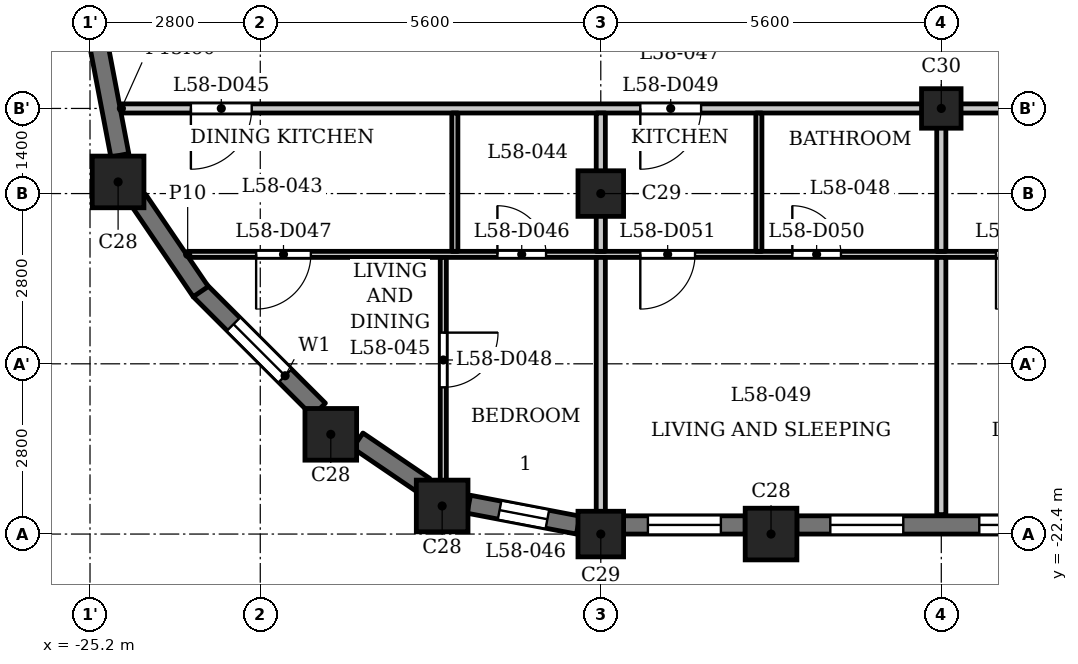
"""IFC4 building model, lengths in metres.
Left out: names, types, materials, properties, quantities, classifications, styles, units other than length and angle.
Written with IfcOpenShell. Run it as: python <this file> out.ifc"""

import sys

from ifc_helpers import new_model, si_unit, direction, frame, frame_2d, origin, origin_2d, place, context, subcontext, project, spatial, rectangle, extrude, element, fill, save


model = new_model("IFC4")
c1 = context("Model", 3, precision=1e-05, world=origin(), true_north=direction((0.0, 1.0)))
c2 = subcontext(c1, "Body", "Model", "MODEL_VIEW")
j1 = project(units=[si_unit("LENGTHUNIT", "METRE"), si_unit("PLANEANGLEUNIT", "RADIAN")], contexts=[c1])
p1 = place(None, origin())
s1 = spatial("IfcSite", under=j1, at=p1, CompositionType="ELEMENT")
p2 = place(p1, origin())
s2 = spatial("IfcBuilding", under=s1, at=p2, CompositionType="ELEMENT")
p3 = place(p2, frame((0.0, 0.0, 223.9)))
s3 = spatial("IfcBuildingStorey", under=s2, at=p3, CompositionType="ELEMENT", Elevation=223.9)
for number, where, z_axis, x_axis in (
    (1, (-19.409, -21.938, 0.0), (0.0, 0.0, 1.0), (1.0, 0.0, 0.0)),
    (2, (-14.0, -22.4, 0.0), (0.0, 0.0, 1.0), (1.0, 0.0, 0.0)),
    (3, (-24.738, -16.609, 0.0), (0.0, 0.0, 1.0), (1.0, 0.0, 0.0)),
    (4, (-21.24, -20.76, 0.0), (0.0, 0.0, 1.0), (1.0, 0.0, 0.0)),
):
    element("IfcColumn", number, at=place(p3, frame(where, z_axis=z_axis, x_axis=x_axis)), inside=s3, PredefinedType="COLUMN", context=c2, shape_type="SweptSolid", body=[
        extrude(rectangle(XDim=0.85, YDim=0.85, at=origin_2d()), origin(), (0.0, 0.0, 1.0), 3.5),
    ])
for number, where, z_axis, x_axis in (
    (5, (-16.8, -22.4, 0.0), (0.0, 0.0, 1.0), (1.0, 0.0, 0.0)),
    (6, (-16.8, -16.8, 0.0), (0.0, 0.0, 1.0), (1.0, 0.0, 0.0)),
):
    element("IfcColumn", number, at=place(p3, frame(where, z_axis=z_axis, x_axis=x_axis)), inside=s3, PredefinedType="COLUMN", context=c2, shape_type="SweptSolid", body=[
        extrude(rectangle(XDim=0.75, YDim=0.75, at=origin_2d()), origin(), (0.0, 0.0, 1.0), 3.5),
    ])
p4 = place(p3, frame((-11.2, -15.4, 0.0), z_axis=(0.0, 0.0, 1.0), x_axis=(1.0, 0.0, 0.0)))
e7 = element("IfcColumn", 7, at=p4, inside=s3, PredefinedType="COLUMN", context=c2, shape_type="SweptSolid", body=[
    extrude(rectangle(XDim=0.65, YDim=0.65, at=origin_2d()), origin(), (0.0, 0.0, 1.0), 3.5),
])
p5 = place(p3, frame((-23.397, -18.391, 0.0), z_axis=(0.0, 0.0, 1.0), x_axis=(0.707106781187, -0.707106781187, 0.0)))
e8 = element("IfcWall", 8, at=p5, inside=s3, PredefinedType="SOLIDWALL", context=c2, shape_type="SweptSolid", body=[
    extrude(rectangle(XDim=2.775, YDim=0.3, at=frame_2d((1.388, 0.0))), origin(), (0.0, 0.0, 1.0), 2.5),
])
p6 = place(p5, frame((0.788, 0.0, 0.6)))
e9 = element("IfcOpeningElement", 9, at=p6, cuts=e8, PredefinedType="OPENING", context=c2, shape_type="SweptSolid", body=[
    extrude(rectangle(XDim=1.2, YDim=1.55, at=frame_2d((0.6, 0.775))), frame((0.0, 0.16, 0.0), z_axis=(0.0, -1.0, 0.0), x_axis=(1.0, 0.0, 0.0)), (0.0, 0.0, 1.0), 0.32),
])
p7 = place(p3, frame((-20.796, -20.862, 0.0), z_axis=(0.0, 0.0, 1.0), x_axis=(0.827035970432, -0.562149004813, 0.0)))
e10 = element("IfcWall", 10, at=p7, inside=s3, PredefinedType="SOLIDWALL", context=c2, shape_type="SweptSolid", body=[
    extrude(rectangle(XDim=1.327, YDim=0.3, at=frame_2d((0.664, 0.0))), origin(), (0.0, 0.0, 1.0), 2.5),
])
p8 = place(p3, frame((-18.971, -21.91, 0.0), z_axis=(0.0, 0.0, 1.0), x_axis=(0.982300037503, -0.187314271538, 0.0)))
e11 = element("IfcWall", 11, at=p8, inside=s3, PredefinedType="SOLIDWALL", context=c2, shape_type="SweptSolid", body=[
    extrude(rectangle(XDim=1.831, YDim=0.3, at=frame_2d((0.916, 0.0))), origin(), (0.0, 0.0, 1.0), 2.5),
])
p9 = place(p8, frame((0.516, 0.0, 0.6)))
e12 = element("IfcOpeningElement", 12, at=p9, cuts=e11, PredefinedType="OPENING", context=c2, shape_type="SweptSolid", body=[
    extrude(rectangle(XDim=0.8, YDim=1.55, at=frame_2d((0.4, 0.775))), frame((0.0, 0.16, 0.0), z_axis=(0.0, -1.0, 0.0), x_axis=(1.0, 0.0, 0.0)), (0.0, 0.0, 1.0), 0.32),
])
p10 = place(p3, frame((-16.425, -22.25, 0.0), z_axis=(0.0, 0.0, 1.0), x_axis=(1.0, 0.0, 0.0)))
e13 = element("IfcWall", 13, at=p10, inside=s3, PredefinedType="SOLIDWALL", context=c2, shape_type="SweptSolid", body=[
    extrude(rectangle(XDim=2.0, YDim=0.3, at=frame_2d((1.0, 0.0))), origin(), (0.0, 0.0, 1.0), 2.5),
])
p11 = place(p10, frame((0.4, 0.0, 0.6)))
e14 = element("IfcOpeningElement", 14, at=p11, cuts=e13, PredefinedType="OPENING", context=c2, shape_type="SweptSolid", body=[
    extrude(rectangle(XDim=1.2, YDim=1.55, at=frame_2d((0.6, 0.775))), frame((0.0, 0.16, 0.0), z_axis=(0.0, -1.0, 0.0), x_axis=(1.0, 0.0, 0.0)), (0.0, 0.0, 1.0), 0.32),
])
p12 = place(p3, frame((-13.575, -22.25, 0.0), z_axis=(0.0, 0.0, 1.0), x_axis=(1.0, 0.0, 0.0)))
e15 = element("IfcWall", 15, at=p12, inside=s3, PredefinedType="SOLIDWALL", context=c2, shape_type="SweptSolid", body=[
    extrude(rectangle(XDim=4.75, YDim=0.3, at=frame_2d((2.375, 0.0))), origin(), (0.0, 0.0, 1.0), 2.5),
])
p13 = place(p12, frame((0.55, 0.0, 0.6)))
e16 = element("IfcOpeningElement", 16, at=p13, cuts=e15, PredefinedType="OPENING", context=c2, shape_type="SweptSolid", body=[
    extrude(rectangle(XDim=1.2, YDim=1.55, at=frame_2d((0.6, 0.775))), frame((0.0, 0.16, 0.0), z_axis=(0.0, -1.0, 0.0), x_axis=(1.0, 0.0, 0.0)), (0.0, 0.0, 1.0), 0.32),
])
p14 = place(p12, frame((3.0, 0.0, 0.6)))
e17 = element("IfcOpeningElement", 17, at=p14, cuts=e15, PredefinedType="OPENING", context=c2, shape_type="SweptSolid", body=[
    extrude(rectangle(XDim=1.2, YDim=1.55, at=frame_2d((0.6, 0.775))), frame((0.0, 0.16, 0.0), z_axis=(0.0, -1.0, 0.0), x_axis=(1.0, 0.0, 0.0)), (0.0, 0.0, 1.0), 0.32),
])
for number, where, z_axis, x_axis in (
    (18, (-25.053, -14.372, 0.0), (0.0, 0.0, 1.0), (0.187, -0.982, 0.0)),
    (19, (-24.408, -16.898, 0.0), (0.0, 0.0, 1.0), (0.562, -0.827, 0.0)),
):
    element("IfcWall", number, at=place(p3, frame(where, z_axis=z_axis, x_axis=x_axis)), inside=s3, PredefinedType="SOLIDWALL", context=c2, shape_type="SweptSolid", body=[
        extrude(rectangle(XDim=1.831, YDim=0.3, at=frame_2d((0.916, 0.0))), origin(), (0.0, 0.0, 1.0), 2.5),
    ])
p15 = place(p3, frame((-23.594, -17.8, 0.0), z_axis=(0.0, 0.0, 1.0), x_axis=(1.0, 0.0, 0.0)))
e20 = element("IfcWall", 20, at=p15, inside=s3, PredefinedType="PARTITIONING", context=c2, shape_type="SweptSolid", body=[
    extrude(rectangle(XDim=47.188, YDim=0.1, at=frame_2d((23.594, 0.0))), origin(), (0.0, 0.0, 1.0), 3.2),
])
p16 = place(p15, frame((5.094, 0.0, 0.0)))
e21 = element("IfcOpeningElement", 21, at=p16, cuts=e20, PredefinedType="OPENING", context=c2, shape_type="SweptSolid", body=[
    extrude(rectangle(XDim=0.8, YDim=2.1, at=frame_2d((0.4, 1.05))), frame((0.0, 0.06, 0.0), z_axis=(0.0, -1.0, 0.0), x_axis=(1.0, 0.0, 0.0)), (0.0, 0.0, 1.0), 0.12),
])
p17 = place(p15, frame((1.126, 0.0, 0.0)))
e22 = element("IfcOpeningElement", 22, at=p17, cuts=e20, PredefinedType="OPENING", context=c2, shape_type="SweptSolid", body=[
    extrude(rectangle(XDim=0.9, YDim=2.1, at=frame_2d((0.45, 1.05))), frame((0.0, 0.06, 0.0), z_axis=(0.0, -1.0, 0.0), x_axis=(1.0, 0.0, 0.0)), (0.0, 0.0, 1.0), 0.12),
])
p18 = place(p15, frame((9.944, 0.0, 0.0)))
e23 = element("IfcOpeningElement", 23, at=p18, cuts=e20, PredefinedType="OPENING", context=c2, shape_type="SweptSolid", body=[
    extrude(rectangle(XDim=0.8, YDim=2.1, at=frame_2d((0.4, 1.05))), frame((0.0, 0.06, 0.0), z_axis=(0.0, -1.0, 0.0), x_axis=(1.0, 0.0, 0.0)), (0.0, 0.0, 1.0), 0.12),
])
p19 = place(p15, frame((7.444, 0.0, 0.0)))
e24 = element("IfcOpeningElement", 24, at=p19, cuts=e20, PredefinedType="OPENING", context=c2, shape_type="SweptSolid", body=[
    extrude(rectangle(XDim=0.9, YDim=2.1, at=frame_2d((0.45, 1.05))), frame((0.0, 0.06, 0.0), z_axis=(0.0, -1.0, 0.0), x_axis=(1.0, 0.0, 0.0)), (0.0, 0.0, 1.0), 0.12),
])
p20 = place(p15, frame((16.544, 0.0, 0.0)))
e25 = element("IfcOpeningElement", 25, at=p20, cuts=e20, PredefinedType="OPENING", context=c2, shape_type="SweptSolid", body=[
    extrude(rectangle(XDim=0.8, YDim=2.1, at=frame_2d((0.4, 1.05))), frame((0.0, 0.06, 0.0), z_axis=(0.0, -1.0, 0.0), x_axis=(1.0, 0.0, 0.0)), (0.0, 0.0, 1.0), 0.12),
])
p21 = place(p15, frame((13.294, 0.0, 0.0)))
e26 = element("IfcOpeningElement", 26, at=p21, cuts=e20, PredefinedType="OPENING", context=c2, shape_type="SweptSolid", body=[
    extrude(rectangle(XDim=0.9, YDim=2.1, at=frame_2d((0.45, 1.05))), frame((0.0, 0.06, 0.0), z_axis=(0.0, -1.0, 0.0), x_axis=(1.0, 0.0, 0.0)), (0.0, 0.0, 1.0), 0.12),
])
p22 = place(p15, frame((21.144, 0.0, 0.0)))
e27 = element("IfcOpeningElement", 27, at=p22, cuts=e20, PredefinedType="OPENING", context=c2, shape_type="SweptSolid", body=[
    extrude(rectangle(XDim=0.8, YDim=2.1, at=frame_2d((0.4, 1.05))), frame((0.0, 0.06, 0.0), z_axis=(0.0, -1.0, 0.0), x_axis=(1.0, 0.0, 0.0)), (0.0, 0.0, 1.0), 0.12),
])
p23 = place(p15, frame((18.894, 0.0, 0.0)))
e28 = element("IfcOpeningElement", 28, at=p23, cuts=e20, PredefinedType="OPENING", context=c2, shape_type="SweptSolid", body=[
    extrude(rectangle(XDim=0.9, YDim=2.1, at=frame_2d((0.45, 1.05))), frame((0.0, 0.06, 0.0), z_axis=(0.0, -1.0, 0.0), x_axis=(1.0, 0.0, 0.0)), (0.0, 0.0, 1.0), 0.12),
])
p24 = place(p15, frame((35.944, 0.0, 0.0)))
e29 = element("IfcOpeningElement", 29, at=p24, cuts=e20, PredefinedType="OPENING", context=c2, shape_type="SweptSolid", body=[
    extrude(rectangle(XDim=0.9, YDim=2.1, at=frame_2d((0.45, 1.05))), frame((0.0, 0.06, 0.0), z_axis=(0.0, -1.0, 0.0), x_axis=(1.0, 0.0, 0.0)), (0.0, 0.0, 1.0), 0.12),
])
p25 = place(p15, frame((32.594, 0.0, 0.0)))
e30 = element("IfcOpeningElement", 30, at=p25, cuts=e20, PredefinedType="OPENING", context=c2, shape_type="SweptSolid", body=[
    extrude(rectangle(XDim=0.9, YDim=2.1, at=frame_2d((0.45, 1.05))), frame((0.0, 0.06, 0.0), z_axis=(0.0, -1.0, 0.0), x_axis=(1.0, 0.0, 0.0)), (0.0, 0.0, 1.0), 0.12),
])
p26 = place(p15, frame((40.944, 0.0, 0.0)))
e31 = element("IfcOpeningElement", 31, at=p26, cuts=e20, PredefinedType="OPENING", context=c2, shape_type="SweptSolid", body=[
    extrude(rectangle(XDim=0.8, YDim=2.1, at=frame_2d((0.4, 1.05))), frame((0.0, 0.06, 0.0), z_axis=(0.0, -1.0, 0.0), x_axis=(1.0, 0.0, 0.0)), (0.0, 0.0, 1.0), 0.12),
])
p27 = place(p15, frame((45.444, 0.0, 0.0)))
e32 = element("IfcOpeningElement", 32, at=p27, cuts=e20, PredefinedType="OPENING", context=c2, shape_type="SweptSolid", body=[
    extrude(rectangle(XDim=0.9, YDim=2.1, at=frame_2d((0.45, 1.05))), frame((0.0, 0.06, 0.0), z_axis=(0.0, -1.0, 0.0), x_axis=(1.0, 0.0, 0.0)), (0.0, 0.0, 1.0), 0.12),
])
p28 = place(p3, frame((-24.684, -15.4, 0.0), z_axis=(0.0, 0.0, 1.0), x_axis=(1.0, 0.0, 0.0)))
e33 = element("IfcWall", 33, at=p28, inside=s3, PredefinedType="PARTITIONING", context=c2, shape_type="SweptSolid", body=[
    extrude(rectangle(XDim=49.368, YDim=0.15, at=frame_2d((24.684, 0.0))), origin(), (0.0, 0.0, 1.0), 3.2),
])
p29 = place(p28, frame((1.143, 0.0, 0.0)))
e34 = element("IfcOpeningElement", 34, at=p29, cuts=e33, PredefinedType="OPENING", context=c2, shape_type="SweptSolid", body=[
    extrude(rectangle(XDim=1.0, YDim=2.1, at=frame_2d((0.5, 1.05))), frame((0.0, 0.085, 0.0), z_axis=(0.0, -1.0, 0.0), x_axis=(1.0, 0.0, 0.0)), (0.0, 0.0, 1.0), 0.17),
])
p30 = place(p28, frame((8.534, 0.0, 0.0)))
e35 = element("IfcOpeningElement", 35, at=p30, cuts=e33, PredefinedType="OPENING", context=c2, shape_type="SweptSolid", body=[
    extrude(rectangle(XDim=1.0, YDim=2.1, at=frame_2d((0.5, 1.05))), frame((0.0, 0.085, 0.0), z_axis=(0.0, -1.0, 0.0), x_axis=(1.0, 0.0, 0.0)), (0.0, 0.0, 1.0), 0.17),
])
p31 = place(p28, frame((15.384, 0.0, 0.0)))
e36 = element("IfcOpeningElement", 36, at=p31, cuts=e33, PredefinedType="OPENING", context=c2, shape_type="SweptSolid", body=[
    extrude(rectangle(XDim=1.0, YDim=2.1, at=frame_2d((0.5, 1.05))), frame((0.0, 0.085, 0.0), z_axis=(0.0, -1.0, 0.0), x_axis=(1.0, 0.0, 0.0)), (0.0, 0.0, 1.0), 0.17),
])
p32 = place(p28, frame((19.984, 0.0, 0.0)))
e37 = element("IfcOpeningElement", 37, at=p32, cuts=e33, PredefinedType="OPENING", context=c2, shape_type="SweptSolid", body=[
    extrude(rectangle(XDim=1.0, YDim=2.1, at=frame_2d((0.5, 1.05))), frame((0.0, 0.085, 0.0), z_axis=(0.0, -1.0, 0.0), x_axis=(1.0, 0.0, 0.0)), (0.0, 0.0, 1.0), 0.17),
])
p33 = place(p28, frame((39.784, 0.0, 0.0)))
e38 = element("IfcOpeningElement", 38, at=p33, cuts=e33, PredefinedType="OPENING", context=c2, shape_type="SweptSolid", body=[
    extrude(rectangle(XDim=1.0, YDim=2.1, at=frame_2d((0.5, 1.05))), frame((0.0, 0.085, 0.0), z_axis=(0.0, -1.0, 0.0), x_axis=(1.0, 0.0, 0.0)), (0.0, 0.0, 1.0), 0.17),
])
p34 = place(p28, frame((47.384, 0.0, 0.0)))
e39 = element("IfcOpeningElement", 39, at=p34, cuts=e33, PredefinedType="OPENING", context=c2, shape_type="SweptSolid", body=[
    extrude(rectangle(XDim=1.0, YDim=2.1, at=frame_2d((0.5, 1.05))), frame((0.0, 0.085, 0.0), z_axis=(0.0, -1.0, 0.0), x_axis=(1.0, 0.0, 0.0)), (0.0, 0.0, 1.0), 0.17),
])
p35 = place(p3, frame((-19.39, -21.86, 0.0), z_axis=(0.0, 0.0, 1.0), x_axis=(0.0, 1.0, 0.0)))
e40 = element("IfcWall", 40, at=p35, inside=s3, PredefinedType="PARTITIONING", context=c2, shape_type="SweptSolid", body=[
    extrude(rectangle(XDim=4.01, YDim=0.1, at=frame_2d((2.005, 0.0))), origin(), (0.0, 0.0, 1.0), 3.2),
])
p36 = place(p35, frame((1.873, 0.0, 0.0)))
e41 = element("IfcOpeningElement", 41, at=p36, cuts=e40, PredefinedType="OPENING", context=c2, shape_type="SweptSolid", body=[
    extrude(rectangle(XDim=0.9, YDim=2.1, at=frame_2d((0.45, 1.05))), frame((0.0, 0.06, 0.0), z_axis=(0.0, -1.0, 0.0), x_axis=(1.0, 0.0, 0.0)), (0.0, 0.0, 1.0), 0.12),
])
p37 = place(p3, frame((-19.2, -17.75, 0.0), z_axis=(0.0, 0.0, 1.0), x_axis=(0.0, 1.0, 0.0)))
e42 = element("IfcWall", 42, at=p37, inside=s3, PredefinedType="PARTITIONING", context=c2, shape_type="SweptSolid", body=[
    extrude(rectangle(XDim=2.275, YDim=0.1, at=frame_2d((1.137, 0.0))), origin(), (0.0, 0.0, 1.0), 3.2),
])
p38 = place(p3, frame((-16.8, -22.31, 0.0), z_axis=(0.0, 0.0, 1.0), x_axis=(0.0, 1.0, 0.0)))
e43 = element("IfcWall", 43, at=p38, inside=s3, PredefinedType="PARTITIONING", context=c2, shape_type="SweptSolid", body=[
    extrude(rectangle(XDim=4.46, YDim=0.15, at=frame_2d((2.23, 0.0))), origin(), (0.0, 0.0, 1.0), 2.55),
])
p39 = place(p3, frame((-16.8, -17.75, 0.0), z_axis=(0.0, 0.0, 1.0), x_axis=(0.0, 1.0, 0.0)))
e44 = element("IfcWall", 44, at=p39, inside=s3, PredefinedType="PARTITIONING", context=c2, shape_type="SweptSolid", body=[
    extrude(rectangle(XDim=2.275, YDim=0.15, at=frame_2d((1.137, 0.0))), origin(), (0.0, 0.0, 1.0), 2.55),
])
p40 = place(p3, frame((-14.2, -17.75, 0.0), z_axis=(0.0, 0.0, 1.0), x_axis=(0.0, 1.0, 0.0)))
e45 = element("IfcWall", 45, at=p40, inside=s3, PredefinedType="PARTITIONING", context=c2, shape_type="SweptSolid", body=[
    extrude(rectangle(XDim=2.275, YDim=0.1, at=frame_2d((1.137, 0.0))), origin(), (0.0, 0.0, 1.0), 3.2),
])
p41 = place(p3, frame((-11.2, -22.08, 0.0), z_axis=(0.0, 0.0, 1.0), x_axis=(0.0, 1.0, 0.0)))
e46 = element("IfcWall", 46, at=p41, inside=s3, PredefinedType="PARTITIONING", context=c2, shape_type="SweptSolid", body=[
    extrude(rectangle(XDim=4.23, YDim=0.15, at=frame_2d((2.115, 0.0))), origin(), (0.0, 0.0, 1.0), 3.2),
])
p42 = place(p3, frame((-11.2, -17.75, 0.0), z_axis=(0.0, 0.0, 1.0), x_axis=(0.0, 1.0, 0.0)))
e47 = element("IfcWall", 47, at=p42, inside=s3, PredefinedType="PARTITIONING", context=c2, shape_type="SweptSolid", body=[
    extrude(rectangle(XDim=2.275, YDim=0.15, at=frame_2d((1.137, 0.0))), origin(), (0.0, 0.0, 1.0), 3.2),
])
p43 = place(p29, origin())
e48 = element("IfcDoor", 48, at=p43, inside=s3, OperationType="SINGLE_SWING_LEFT", PredefinedType="DOOR", context=c2, shape_type="SweptSolid", body=[
    extrude(rectangle(XDim=1.0, YDim=2.1, at=frame_2d((0.5, 1.05))), frame((0.0, 0.025, 0.0), z_axis=(0.0, -1.0, 0.0), x_axis=(1.0, 0.0, 0.0)), (0.0, 0.0, 1.0), 0.05),
])
fill(e34, e48)
p44 = place(p16, origin())
e49 = element("IfcDoor", 49, at=p44, inside=s3, OperationType="SINGLE_SWING_RIGHT", PredefinedType="DOOR", context=c2, shape_type="SweptSolid", body=[
    extrude(rectangle(XDim=0.8, YDim=2.1, at=frame_2d((0.4, 1.05))), frame((0.0, 0.025, 0.0), z_axis=(0.0, -1.0, 0.0), x_axis=(1.0, 0.0, 0.0)), (0.0, 0.0, 1.0), 0.05),
])
fill(e21, e49)
p45 = place(p17, origin())
e50 = element("IfcDoor", 50, at=p45, inside=s3, OperationType="SINGLE_SWING_LEFT", PredefinedType="DOOR", context=c2, shape_type="SweptSolid", body=[
    extrude(rectangle(XDim=0.9, YDim=2.1, at=frame_2d((0.45, 1.05))), frame((0.0, 0.025, 0.0), z_axis=(0.0, -1.0, 0.0), x_axis=(1.0, 0.0, 0.0)), (0.0, 0.0, 1.0), 0.05),
])
fill(e22, e50)
p46 = place(p36, origin())
e51 = element("IfcDoor", 51, at=p46, inside=s3, OperationType="SINGLE_SWING_RIGHT", PredefinedType="DOOR", context=c2, shape_type="SweptSolid", body=[
    extrude(rectangle(XDim=0.9, YDim=2.1, at=frame_2d((0.45, 1.05))), frame((0.0, 0.025, 0.0), z_axis=(0.0, -1.0, 0.0), x_axis=(1.0, 0.0, 0.0)), (0.0, 0.0, 1.0), 0.05),
])
fill(e41, e51)
p47 = place(p30, origin())
e52 = element("IfcDoor", 52, at=p47, inside=s3, OperationType="SINGLE_SWING_LEFT", PredefinedType="DOOR", context=c2, shape_type="SweptSolid", body=[
    extrude(rectangle(XDim=1.0, YDim=2.1, at=frame_2d((0.5, 1.05))), frame((0.0, 0.025, 0.0), z_axis=(0.0, -1.0, 0.0), x_axis=(1.0, 0.0, 0.0)), (0.0, 0.0, 1.0), 0.05),
])
fill(e35, e52)
p48 = place(p18, origin())
e53 = element("IfcDoor", 53, at=p48, inside=s3, OperationType="SINGLE_SWING_RIGHT", PredefinedType="DOOR", context=c2, shape_type="SweptSolid", body=[
    extrude(rectangle(XDim=0.8, YDim=2.1, at=frame_2d((0.4, 1.05))), frame((0.0, 0.025, 0.0), z_axis=(0.0, -1.0, 0.0), x_axis=(1.0, 0.0, 0.0)), (0.0, 0.0, 1.0), 0.05),
])
fill(e23, e53)
p49 = place(p19, origin())
e54 = element("IfcDoor", 54, at=p49, inside=s3, OperationType="SINGLE_SWING_LEFT", PredefinedType="DOOR", context=c2, shape_type="SweptSolid", body=[
    extrude(rectangle(XDim=0.9, YDim=2.1, at=frame_2d((0.45, 1.05))), frame((0.0, 0.025, 0.0), z_axis=(0.0, -1.0, 0.0), x_axis=(1.0, 0.0, 0.0)), (0.0, 0.0, 1.0), 0.05),
])
fill(e24, e54)
p50 = place(p21, origin())
e55 = element("IfcDoor", 55, at=p50, inside=s3, OperationType="SINGLE_SWING_LEFT", PredefinedType="DOOR", context=c2, shape_type="SweptSolid", body=[
    extrude(rectangle(XDim=0.9, YDim=2.1, at=frame_2d((0.45, 1.05))), frame((0.0, 0.025, 0.0), z_axis=(0.0, -1.0, 0.0), x_axis=(1.0, 0.0, 0.0)), (0.0, 0.0, 1.0), 0.05),
])
fill(e26, e55)
p51 = place(p6, origin())
e56 = element("IfcWindow", 56, at=p51, inside=s3, PartitioningType="SINGLE_PANEL", PredefinedType="WINDOW", context=c2, shape_type="SweptSolid", body=[
    extrude(rectangle(XDim=1.2, YDim=1.55, at=frame_2d((0.6, 0.775))), frame((0.0, 0.03, 0.0), z_axis=(0.0, -1.0, 0.0), x_axis=(1.0, 0.0, 0.0)), (0.0, 0.0, 1.0), 0.06),
])
fill(e9, e56)
p52 = place(p9, origin())
e57 = element("IfcWindow", 57, at=p52, inside=s3, PartitioningType="SINGLE_PANEL", PredefinedType="WINDOW", context=c2, shape_type="SweptSolid", body=[
    extrude(rectangle(XDim=0.8, YDim=1.55, at=frame_2d((0.4, 0.775))), frame((0.0, 0.03, 0.0), z_axis=(0.0, -1.0, 0.0), x_axis=(1.0, 0.0, 0.0)), (0.0, 0.0, 1.0), 0.06),
])
fill(e12, e57)
p53 = place(p11, origin())
e58 = element("IfcWindow", 58, at=p53, inside=s3, PartitioningType="SINGLE_PANEL", PredefinedType="WINDOW", context=c2, shape_type="SweptSolid", body=[
    extrude(rectangle(XDim=1.2, YDim=1.55, at=frame_2d((0.6, 0.775))), frame((0.0, 0.03, 0.0), z_axis=(0.0, -1.0, 0.0), x_axis=(1.0, 0.0, 0.0)), (0.0, 0.0, 1.0), 0.06),
])
fill(e14, e58)
p54 = place(p13, origin())
e59 = element("IfcWindow", 59, at=p54, inside=s3, PartitioningType="SINGLE_PANEL", PredefinedType="WINDOW", context=c2, shape_type="SweptSolid", body=[
    extrude(rectangle(XDim=1.2, YDim=1.55, at=frame_2d((0.6, 0.775))), frame((0.0, 0.03, 0.0), z_axis=(0.0, -1.0, 0.0), x_axis=(1.0, 0.0, 0.0)), (0.0, 0.0, 1.0), 0.06),
])
fill(e16, e59)
p55 = place(p14, origin())
e60 = element("IfcWindow", 60, at=p55, inside=s3, PartitioningType="SINGLE_PANEL", PredefinedType="WINDOW", context=c2, shape_type="SweptSolid", body=[
    extrude(rectangle(XDim=1.2, YDim=1.55, at=frame_2d((0.6, 0.775))), frame((0.0, 0.03, 0.0), z_axis=(0.0, -1.0, 0.0), x_axis=(1.0, 0.0, 0.0)), (0.0, 0.0, 1.0), 0.06),
])
fill(e17, e60)
save(model, sys.argv[1])
